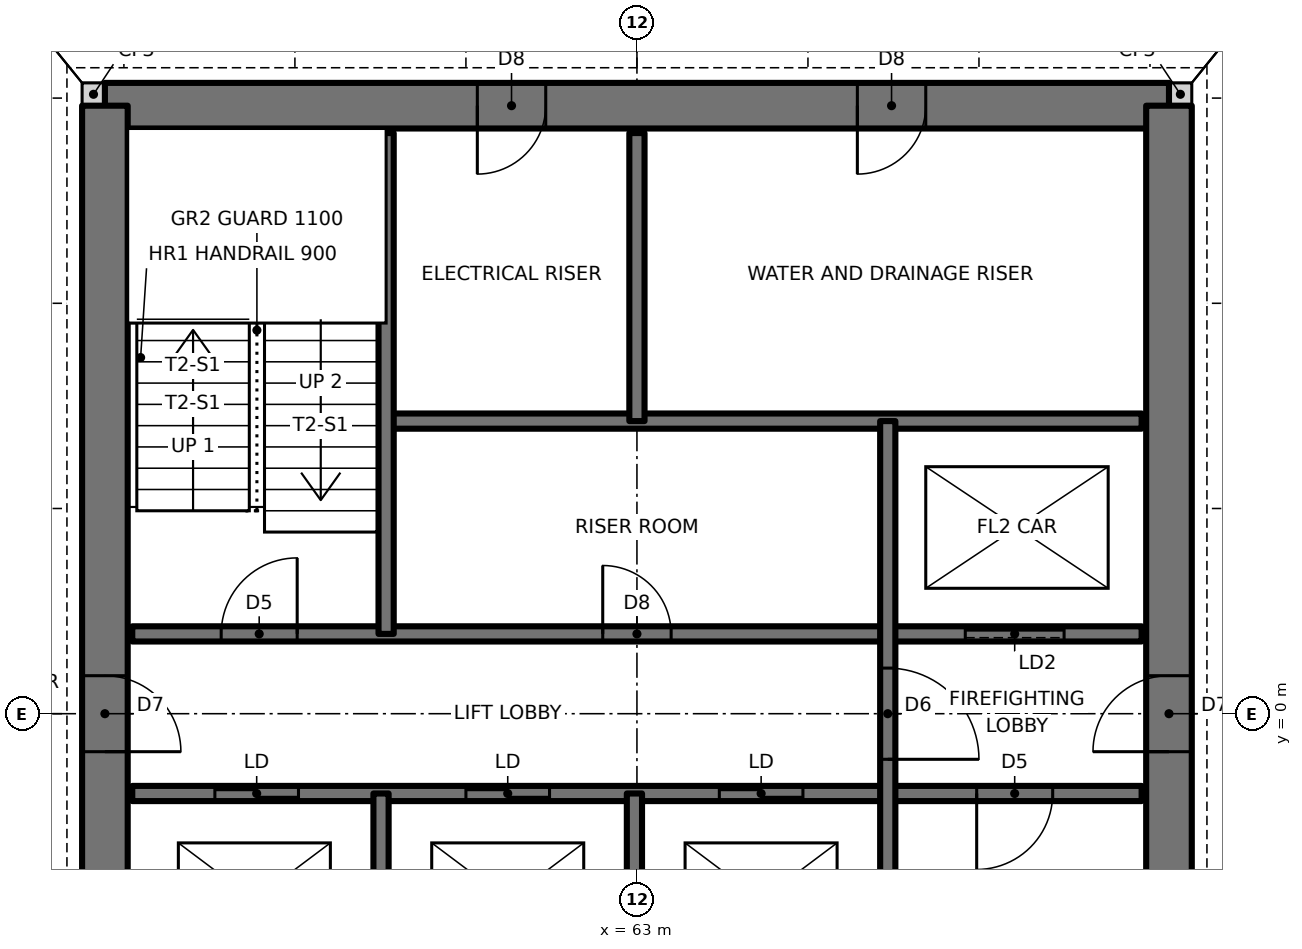
"""IFC4 building model, lengths in metres.
Left out: names, types, materials, properties, quantities, classifications, styles, units other than length and angle.
Written with IfcOpenShell. Run it as: python <this file> out.ifc"""

import sys

from ifc_helpers import new_model, si_unit, direction, frame, frame_2d, origin, place, context, subcontext, project, spatial, rectangle, extrude, element, fill, save


model = new_model("IFC4")
c1 = context("Model", 3, precision=1e-05, world=origin(), true_north=direction((0.0, 1.0)))
c2 = subcontext(c1, "Body", "Model", "MODEL_VIEW")
j1 = project(units=[si_unit("LENGTHUNIT", "METRE"), si_unit("PLANEANGLEUNIT", "RADIAN")], contexts=[c1])
p1 = place(None, origin())
s1 = spatial("IfcSite", under=j1, at=p1, CompositionType="ELEMENT")
p2 = place(p1, origin())
s2 = spatial("IfcBuilding", under=s1, at=p2, CompositionType="ELEMENT")
p3 = place(p2, frame((0.0, 0.0, 119.0)))
s3 = spatial("IfcBuildingStorey", under=s2, at=p3, CompositionType="ELEMENT", Elevation=119.0)
for number, where, z_axis, x_axis in (
    (1, (70.0, 8.15, 0.0), (0.0, 0.0, 1.0), (1.0, 0.0, 0.0)),
    (2, (55.7, 8.15, 0.0), (0.0, 0.0, 1.0), (1.0, 0.0, 0.0)),
):
    element("IfcWall", number, at=place(p3, frame(where, z_axis=z_axis, x_axis=x_axis)), inside=s3, PredefinedType="SOLIDWALL", context=c2, shape_type="SweptSolid", body=[
        extrude(rectangle(XDim=0.3, YDim=0.3, at=frame_2d((0.15, 0.0))), origin(), (0.0, 0.0, 1.0), 3.5),
    ])
p4 = place(p3, frame((70.0, 8.0, 0.0), z_axis=(0.0, 0.0, 1.0), x_axis=(-1.0, 0.0, 0.0)))
e3 = element("IfcWall", 3, at=p4, inside=s3, PredefinedType="SHEAR", context=c2, shape_type="SweptSolid", body=[
    extrude(rectangle(XDim=14.0, YDim=0.6, at=frame_2d((7.0, 0.0))), origin(), (0.0, 0.0, 1.0), 3.5),
])
p5 = place(p4, frame((8.2, 0.0, 0.0)))
e4 = element("IfcOpeningElement", 4, at=p5, cuts=e3, PredefinedType="OPENING", context=c2, shape_type="SweptSolid", body=[
    extrude(rectangle(XDim=0.9, YDim=2.1, at=frame_2d((0.45, 1.05))), frame((0.0, 0.31, 0.0), z_axis=(0.0, -1.0, 0.0), x_axis=(1.0, 0.0, 0.0)), (0.0, 0.0, 1.0), 0.62),
])
p6 = place(p4, frame((3.2, 0.0, 0.0)))
e5 = element("IfcOpeningElement", 5, at=p6, cuts=e3, PredefinedType="OPENING", context=c2, shape_type="SweptSolid", body=[
    extrude(rectangle(XDim=0.9, YDim=2.1, at=frame_2d((0.45, 1.05))), frame((0.0, 0.31, 0.0), z_axis=(0.0, -1.0, 0.0), x_axis=(1.0, 0.0, 0.0)), (0.0, 0.0, 1.0), 0.62),
])
p7 = place(p3, frame((70.0, -8.0, 0.0), z_axis=(0.0, 0.0, 1.0), x_axis=(0.0, 1.0, 0.0)))
e6 = element("IfcWall", 6, at=p7, inside=s3, PredefinedType="SHEAR", context=c2, shape_type="SweptSolid", body=[
    extrude(rectangle(XDim=16.0, YDim=0.6, at=frame_2d((8.0, 0.0))), origin(), (0.0, 0.0, 1.0), 3.5),
])
p8 = place(p7, frame((7.5, 0.0, 0.0)))
e7 = element("IfcOpeningElement", 7, at=p8, cuts=e6, PredefinedType="OPENING", context=c2, shape_type="SweptSolid", body=[
    extrude(rectangle(XDim=1.0, YDim=2.1, at=frame_2d((0.5, 1.05))), frame((0.0, 0.31, 0.0), z_axis=(0.0, -1.0, 0.0), x_axis=(1.0, 0.0, 0.0)), (0.0, 0.0, 1.0), 0.62),
])
p9 = place(p3, frame((56.0, 8.0, 0.0), z_axis=(0.0, 0.0, 1.0), x_axis=(0.0, -1.0, 0.0)))
e8 = element("IfcWall", 8, at=p9, inside=s3, PredefinedType="SHEAR", context=c2, shape_type="SweptSolid", body=[
    extrude(rectangle(XDim=16.0, YDim=0.6, at=frame_2d((8.0, 0.0))), origin(), (0.0, 0.0, 1.0), 3.5),
])
p10 = place(p9, frame((7.5, 0.0, 0.0)))
e9 = element("IfcOpeningElement", 9, at=p10, cuts=e8, PredefinedType="OPENING", context=c2, shape_type="SweptSolid", body=[
    extrude(rectangle(XDim=1.0, YDim=2.1, at=frame_2d((0.5, 1.05))), frame((0.0, 0.31, 0.0), z_axis=(0.0, -1.0, 0.0), x_axis=(1.0, 0.0, 0.0)), (0.0, 0.0, 1.0), 0.62),
])
p11 = place(p3, frame((56.36, -1.05, 0.0), z_axis=(0.0, 0.0, 1.0), x_axis=(1.0, 0.0, 0.0)))
e10 = element("IfcWall", 10, at=p11, inside=s3, PredefinedType="SOLIDWALL", context=c2, shape_type="SweptSolid", body=[
    extrude(rectangle(XDim=13.28, YDim=0.2, at=frame_2d((6.64, 0.0))), origin(), (0.0, 0.0, 1.0), 3.5),
])
p12 = place(p11, frame((11.11, 0.0, 0.0)))
e11 = element("IfcOpeningElement", 11, at=p12, cuts=e10, PredefinedType="OPENING", context=c2, shape_type="SweptSolid", body=[
    extrude(rectangle(XDim=1.0, YDim=2.1, at=frame_2d((0.5, 1.05))), frame((0.0, 0.11, 0.0), z_axis=(0.0, -1.0, 0.0), x_axis=(1.0, 0.0, 0.0)), (0.0, 0.0, 1.0), 0.22),
])
p13 = place(p11, frame((1.087, 0.0, 0.0)))
e12 = element("IfcOpeningElement", 12, at=p13, cuts=e10, PredefinedType="OPENING", context=c2, shape_type="SweptSolid", body=[
    extrude(rectangle(XDim=1.1, YDim=2.1, at=frame_2d((0.55, 1.05))), frame((0.0, 0.11, 0.0), z_axis=(0.0, -1.0, 0.0), x_axis=(1.0, 0.0, 0.0)), (0.0, 0.0, 1.0), 0.22),
])
p14 = place(p11, frame((4.39, 0.0, 0.0)))
e13 = element("IfcOpeningElement", 13, at=p14, cuts=e10, PredefinedType="OPENING", context=c2, shape_type="SweptSolid", body=[
    extrude(rectangle(XDim=1.1, YDim=2.1, at=frame_2d((0.55, 1.05))), frame((0.0, 0.11, 0.0), z_axis=(0.0, -1.0, 0.0), x_axis=(1.0, 0.0, 0.0)), (0.0, 0.0, 1.0), 0.22),
])
p15 = place(p11, frame((7.724, 0.0, 0.0)))
e14 = element("IfcOpeningElement", 14, at=p15, cuts=e10, PredefinedType="OPENING", context=c2, shape_type="SweptSolid", body=[
    extrude(rectangle(XDim=1.1, YDim=2.1, at=frame_2d((0.55, 1.05))), frame((0.0, 0.11, 0.0), z_axis=(0.0, -1.0, 0.0), x_axis=(1.0, 0.0, 0.0)), (0.0, 0.0, 1.0), 0.22),
])
p16 = place(p3, frame((56.36, 1.05, 0.0), z_axis=(0.0, 0.0, 1.0), x_axis=(1.0, 0.0, 0.0)))
e15 = element("IfcWall", 15, at=p16, inside=s3, PredefinedType="SOLIDWALL", context=c2, shape_type="SweptSolid", body=[
    extrude(rectangle(XDim=13.28, YDim=0.2, at=frame_2d((6.64, 0.0))), origin(), (0.0, 0.0, 1.0), 3.5),
])
p17 = place(p16, frame((1.17, 0.0, 0.0)))
e16 = element("IfcOpeningElement", 16, at=p17, cuts=e15, PredefinedType="OPENING", context=c2, shape_type="SweptSolid", body=[
    extrude(rectangle(XDim=1.0, YDim=2.1, at=frame_2d((0.5, 1.05))), frame((0.0, 0.11, 0.0), z_axis=(0.0, -1.0, 0.0), x_axis=(1.0, 0.0, 0.0)), (0.0, 0.0, 1.0), 0.22),
])
p18 = place(p16, frame((6.19, 0.0, 0.0)))
e17 = element("IfcOpeningElement", 17, at=p18, cuts=e15, PredefinedType="OPENING", context=c2, shape_type="SweptSolid", body=[
    extrude(rectangle(XDim=0.9, YDim=2.1, at=frame_2d((0.45, 1.05))), frame((0.0, 0.11, 0.0), z_axis=(0.0, -1.0, 0.0), x_axis=(1.0, 0.0, 0.0)), (0.0, 0.0, 1.0), 0.22),
])
p19 = place(p16, frame((10.96, 0.0, 0.0)))
e18 = element("IfcOpeningElement", 18, at=p19, cuts=e15, PredefinedType="OPENING", context=c2, shape_type="SweptSolid", body=[
    extrude(rectangle(XDim=1.3, YDim=2.1, at=frame_2d((0.65, 1.05))), frame((0.0, 0.11, 0.0), z_axis=(0.0, -1.0, 0.0), x_axis=(1.0, 0.0, 0.0)), (0.0, 0.0, 1.0), 0.22),
])
p20 = place(p3, frame((59.7, 3.85, 0.0), z_axis=(0.0, 0.0, 1.0), x_axis=(1.0, 0.0, 0.0)))
e19 = element("IfcWall", 19, at=p20, inside=s3, PredefinedType="SOLIDWALL", context=c2, shape_type="SweptSolid", body=[
    extrude(rectangle(XDim=9.94, YDim=0.2, at=frame_2d((4.97, 0.0))), origin(), (0.0, 0.0, 1.0), 3.5),
])
p21 = place(p3, frame((66.3, -7.64, 0.0), z_axis=(0.0, 0.0, 1.0), x_axis=(0.0, 1.0, 0.0)))
e20 = element("IfcWall", 20, at=p21, inside=s3, PredefinedType="SOLIDWALL", context=c2, shape_type="SweptSolid", body=[
    extrude(rectangle(XDim=11.49, YDim=0.2, at=frame_2d((5.745, 0.0))), origin(), (0.0, 0.0, 1.0), 3.5),
])
p22 = place(p21, frame((7.04, 0.0, 0.0)))
e21 = element("IfcOpeningElement", 21, at=p22, cuts=e20, PredefinedType="OPENING", context=c2, shape_type="SweptSolid", body=[
    extrude(rectangle(XDim=1.2, YDim=2.1, at=frame_2d((0.6, 1.05))), frame((0.0, 0.11, 0.0), z_axis=(0.0, -1.0, 0.0), x_axis=(1.0, 0.0, 0.0)), (0.0, 0.0, 1.0), 0.22),
])
p23 = place(p3, frame((63.0, 3.85, 0.0), z_axis=(0.0, 0.0, 1.0), x_axis=(0.0, 1.0, 0.0)))
e22 = element("IfcWall", 22, at=p23, inside=s3, PredefinedType="SOLIDWALL", context=c2, shape_type="SweptSolid", body=[
    extrude(rectangle(XDim=3.79, YDim=0.2, at=frame_2d((1.895, 0.0))), origin(), (0.0, 0.0, 1.0), 3.5),
])
p24 = place(p3, frame((62.967, -3.85, 0.0), z_axis=(0.0, 0.0, 1.0), x_axis=(0.0, 1.0, 0.0)))
e23 = element("IfcWall", 23, at=p24, inside=s3, PredefinedType="SOLIDWALL", context=c2, shape_type="SweptSolid", body=[
    extrude(rectangle(XDim=2.8, YDim=0.2, at=frame_2d((1.4, 0.0))), origin(), (0.0, 0.0, 1.0), 3.5),
])
p25 = place(p3, frame((59.7, 1.05, 0.0), z_axis=(0.0, 0.0, 1.0), x_axis=(0.0, 1.0, 0.0)))
e24 = element("IfcWall", 24, at=p25, inside=s3, PredefinedType="SOLIDWALL", context=c2, shape_type="SweptSolid", body=[
    extrude(rectangle(XDim=6.59, YDim=0.2, at=frame_2d((3.295, 0.0))), origin(), (0.0, 0.0, 1.0), 3.5),
])
p26 = place(p3, frame((59.633, -3.85, 0.0), z_axis=(0.0, 0.0, 1.0), x_axis=(0.0, 1.0, 0.0)))
e25 = element("IfcWall", 25, at=p26, inside=s3, PredefinedType="SOLIDWALL", context=c2, shape_type="SweptSolid", body=[
    extrude(rectangle(XDim=2.8, YDim=0.2, at=frame_2d((1.4, 0.0))), origin(), (0.0, 0.0, 1.0), 3.5),
])
p27 = place(p17, origin())
e26 = element("IfcDoor", 26, at=p27, inside=s3, OperationType="SINGLE_SWING_RIGHT", PredefinedType="DOOR", context=c2, shape_type="SweptSolid", body=[
    extrude(rectangle(XDim=1.0, YDim=2.1, at=frame_2d((0.5, 1.05))), frame((0.0, 0.025, 0.0), z_axis=(0.0, -1.0, 0.0), x_axis=(1.0, 0.0, 0.0)), (0.0, 0.0, 1.0), 0.05),
])
fill(e16, e26)
p28 = place(p12, frame((1.0, 0.0, 0.0), z_axis=(0.0, 0.0, 1.0), x_axis=(-1.0, 0.0, 0.0)))
e27 = element("IfcDoor", 27, at=p28, inside=s3, OperationType="SINGLE_SWING_RIGHT", PredefinedType="DOOR", context=c2, shape_type="SweptSolid", body=[
    extrude(rectangle(XDim=1.0, YDim=2.1, at=frame_2d((0.5, 1.05))), frame((0.0, 0.025, 0.0), z_axis=(0.0, -1.0, 0.0), x_axis=(1.0, 0.0, 0.0)), (0.0, 0.0, 1.0), 0.05),
])
fill(e11, e27)
p29 = place(p22, frame((1.2, 0.0, 0.0), z_axis=(0.0, 0.0, 1.0), x_axis=(-1.0, 0.0, 0.0)))
e28 = element("IfcDoor", 28, at=p29, inside=s3, OperationType="SINGLE_SWING_RIGHT", PredefinedType="DOOR", context=c2, shape_type="SweptSolid", body=[
    extrude(rectangle(XDim=1.2, YDim=2.1, at=frame_2d((0.6, 1.05))), frame((0.0, 0.025, 0.0), z_axis=(0.0, -1.0, 0.0), x_axis=(1.0, 0.0, 0.0)), (0.0, 0.0, 1.0), 0.05),
])
fill(e21, e28)
p30 = place(p18, origin())
e29 = element("IfcDoor", 29, at=p30, inside=s3, OperationType="SINGLE_SWING_LEFT", PredefinedType="DOOR", context=c2, shape_type="SweptSolid", body=[
    extrude(rectangle(XDim=0.9, YDim=2.1, at=frame_2d((0.45, 1.05))), frame((0.0, 0.025, 0.0), z_axis=(0.0, -1.0, 0.0), x_axis=(1.0, 0.0, 0.0)), (0.0, 0.0, 1.0), 0.05),
])
fill(e17, e29)
p31 = place(p10, origin())
e30 = element("IfcDoor", 30, at=p31, inside=s3, OperationType="SINGLE_SWING_RIGHT", PredefinedType="DOOR", context=c2, shape_type="SweptSolid", body=[
    extrude(rectangle(XDim=1.0, YDim=2.1, at=frame_2d((0.5, 1.05))), frame((0.0, 0.025, 0.0), z_axis=(0.0, -1.0, 0.0), x_axis=(1.0, 0.0, 0.0)), (0.0, 0.0, 1.0), 0.05),
])
fill(e9, e30)
p32 = place(p8, origin())
e31 = element("IfcDoor", 31, at=p32, inside=s3, OperationType="SINGLE_SWING_LEFT", PredefinedType="DOOR", context=c2, shape_type="SweptSolid", body=[
    extrude(rectangle(XDim=1.0, YDim=2.1, at=frame_2d((0.5, 1.05))), frame((0.0, 0.025, 0.0), z_axis=(0.0, -1.0, 0.0), x_axis=(1.0, 0.0, 0.0)), (0.0, 0.0, 1.0), 0.05),
])
fill(e7, e31)
p33 = place(p5, origin())
e32 = element("IfcDoor", 32, at=p33, inside=s3, OperationType="SINGLE_SWING_RIGHT", PredefinedType="DOOR", context=c2, shape_type="SweptSolid", body=[
    extrude(rectangle(XDim=0.9, YDim=2.1, at=frame_2d((0.45, 1.05))), frame((0.0, 0.025, 0.0), z_axis=(0.0, -1.0, 0.0), x_axis=(1.0, 0.0, 0.0)), (0.0, 0.0, 1.0), 0.05),
])
fill(e4, e32)
p34 = place(p6, origin())
e33 = element("IfcDoor", 33, at=p34, inside=s3, OperationType="SINGLE_SWING_RIGHT", PredefinedType="DOOR", context=c2, shape_type="SweptSolid", body=[
    extrude(rectangle(XDim=0.9, YDim=2.1, at=frame_2d((0.45, 1.05))), frame((0.0, 0.025, 0.0), z_axis=(0.0, -1.0, 0.0), x_axis=(1.0, 0.0, 0.0)), (0.0, 0.0, 1.0), 0.05),
])
fill(e5, e33)
p35 = place(p13, origin())
e34 = element("IfcDoor", 34, at=p35, inside=s3, OperationType="DOUBLE_DOOR_SLIDING", PredefinedType="DOOR", context=c2, shape_type="SweptSolid", body=[
    extrude(rectangle(XDim=1.1, YDim=2.1, at=frame_2d((0.55, 1.05))), frame((0.0, 0.025, 0.0), z_axis=(0.0, -1.0, 0.0), x_axis=(1.0, 0.0, 0.0)), (0.0, 0.0, 1.0), 0.05),
])
fill(e12, e34)
p36 = place(p14, origin())
e35 = element("IfcDoor", 35, at=p36, inside=s3, OperationType="DOUBLE_DOOR_SLIDING", PredefinedType="DOOR", context=c2, shape_type="SweptSolid", body=[
    extrude(rectangle(XDim=1.1, YDim=2.1, at=frame_2d((0.55, 1.05))), frame((0.0, 0.025, 0.0), z_axis=(0.0, -1.0, 0.0), x_axis=(1.0, 0.0, 0.0)), (0.0, 0.0, 1.0), 0.05),
])
fill(e13, e35)
p37 = place(p15, origin())
e36 = element("IfcDoor", 36, at=p37, inside=s3, OperationType="DOUBLE_DOOR_SLIDING", PredefinedType="DOOR", context=c2, shape_type="SweptSolid", body=[
    extrude(rectangle(XDim=1.1, YDim=2.1, at=frame_2d((0.55, 1.05))), frame((0.0, 0.025, 0.0), z_axis=(0.0, -1.0, 0.0), x_axis=(1.0, 0.0, 0.0)), (0.0, 0.0, 1.0), 0.05),
])
fill(e14, e36)
p38 = place(p19, origin())
e37 = element("IfcDoor", 37, at=p38, inside=s3, OperationType="SLIDING_TO_LEFT", PredefinedType="DOOR", context=c2, shape_type="SweptSolid", body=[
    extrude(rectangle(XDim=1.3, YDim=2.1, at=frame_2d((0.65, 1.05))), frame((0.0, 0.025, 0.0), z_axis=(0.0, -1.0, 0.0), x_axis=(1.0, 0.0, 0.0)), (0.0, 0.0, 1.0), 0.05),
])
fill(e18, e37)
save(model, sys.argv[1])
